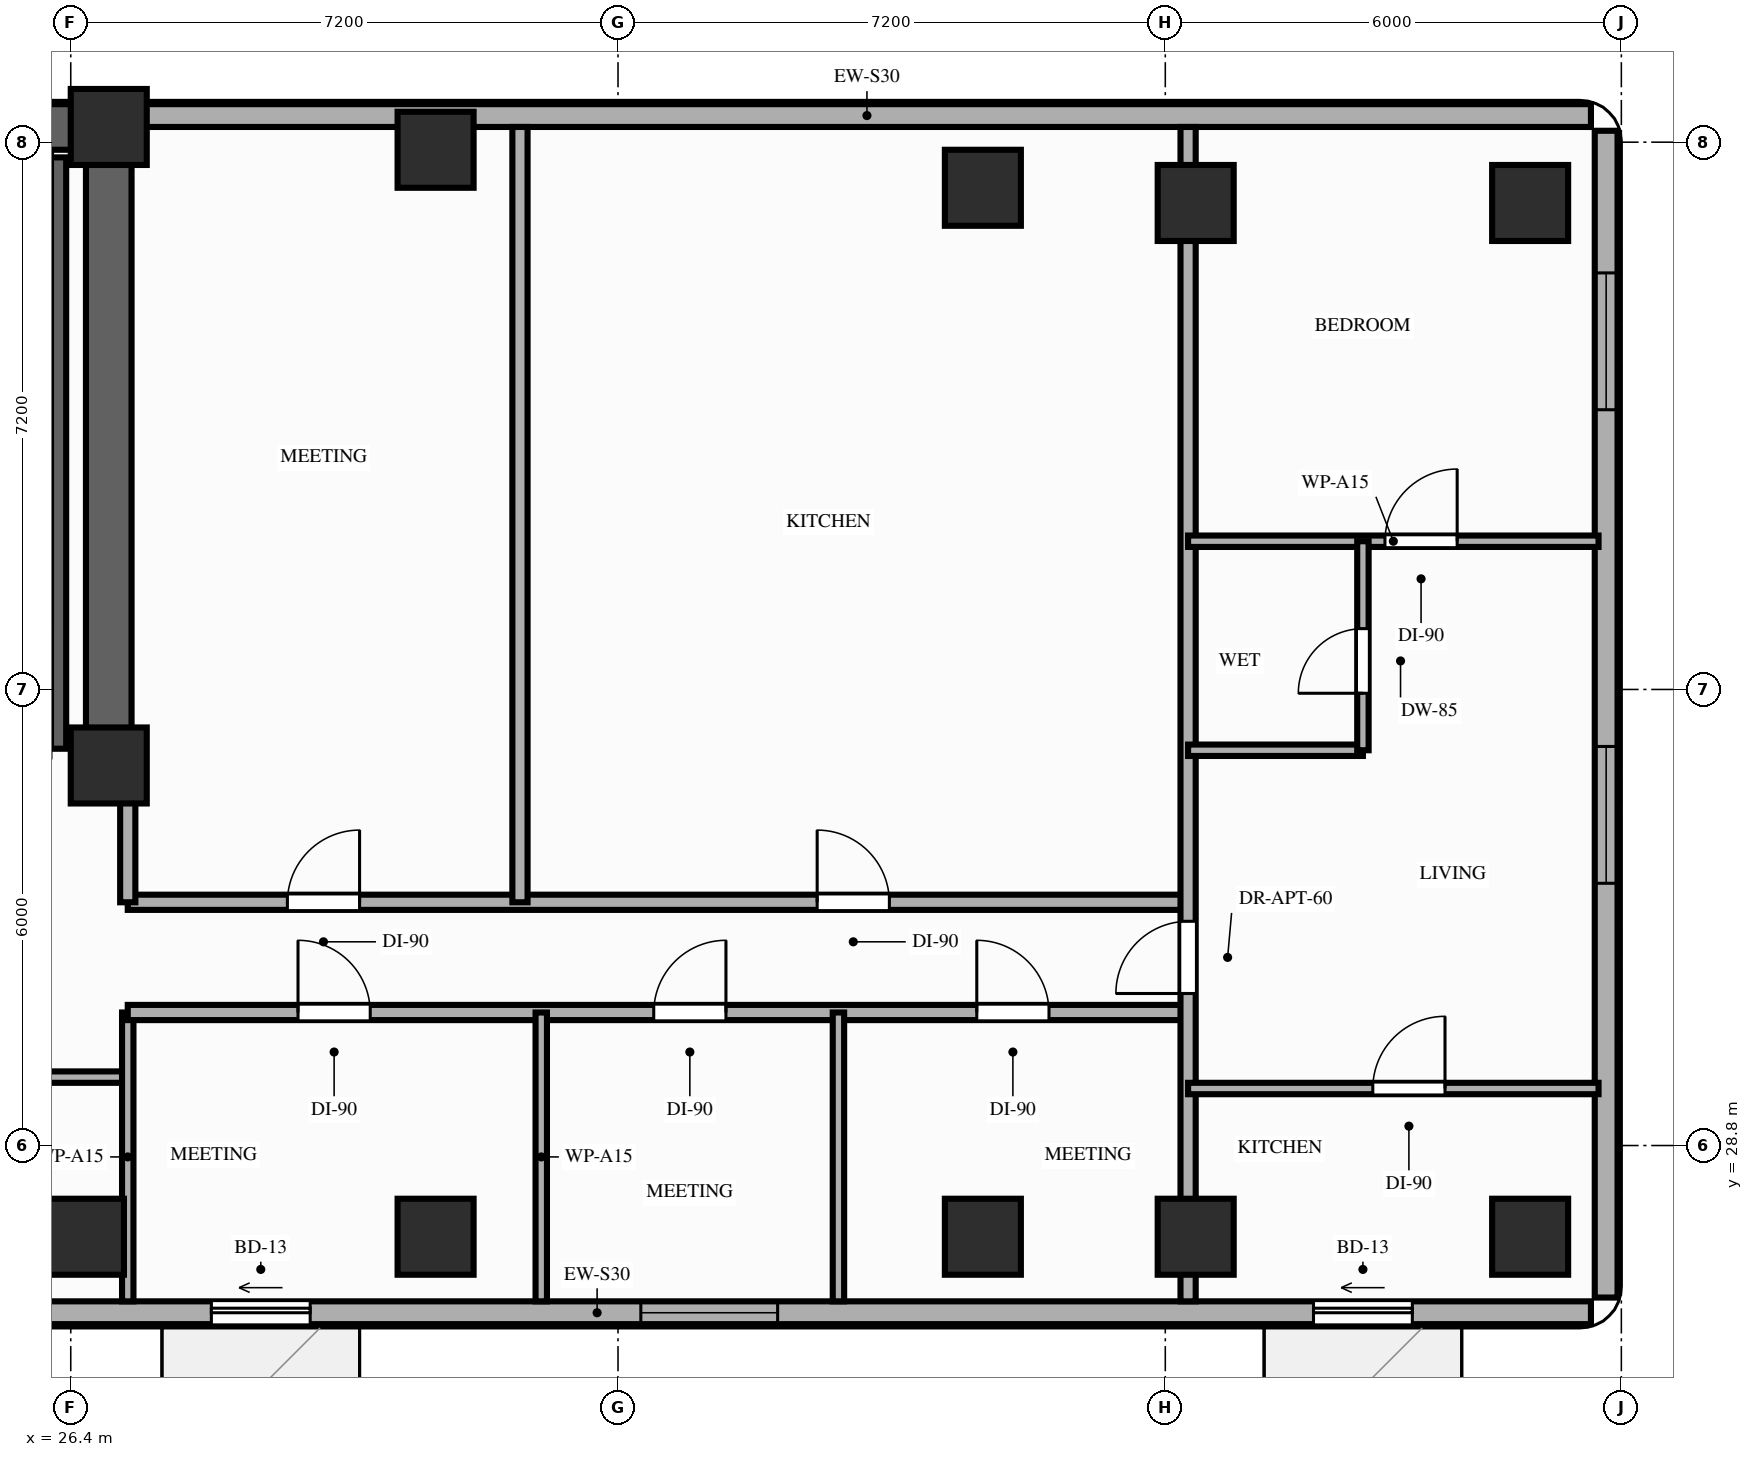
"""IFC4 building model, lengths in metres.
Left out: names, types, materials, properties, quantities, classifications, styles, units other than length and angle.
Written with IfcOpenShell. Run it as: python <this file> out.ifc"""

import sys

from ifc_helpers import new_model, si_unit, direction, frame, frame_2d, origin, origin_2d, place, context, subcontext, project, spatial, rectangle, extrude, element, fill, save


model = new_model("IFC4")
c1 = context("Model", 3, precision=1e-05, world=origin(), true_north=direction((0.0, 1.0)))
c2 = subcontext(c1, "Body", "Model", "MODEL_VIEW")
j1 = project(units=[si_unit("LENGTHUNIT", "METRE"), si_unit("PLANEANGLEUNIT", "RADIAN")], contexts=[c1])
p1 = place(None, origin())
s1 = spatial("IfcSite", under=j1, at=p1, CompositionType="ELEMENT")
p2 = place(p1, origin())
s2 = spatial("IfcBuilding", under=s1, at=p2, CompositionType="ELEMENT")
p3 = place(p2, frame((0.0, 0.0, 110.6)))
s3 = spatial("IfcBuildingStorey", under=s2, at=p3, CompositionType="ELEMENT", Elevation=110.6)
for number, where, z_axis, x_axis in (
    (1, (26.9, 33.8, 0.0), (0.0, 0.0, 1.0), (1.0, 0.0, 0.0)),
    (2, (26.9, 42.2, 0.0), (0.0, 0.0, 1.0), (1.0, 0.0, 0.0)),
    (3, (26.6, 27.6, 0.0), (0.0, 0.0, 1.0), (1.0, 0.0, 0.0)),
    (4, (31.2, 27.6, 0.0), (0.0, 0.0, 1.0), (1.0, 0.0, 0.0)),
    (5, (31.2, 41.9, 0.0), (0.0, 0.0, 1.0), (1.0, 0.0, 0.0)),
    (6, (38.4, 27.6, 0.0), (0.0, 0.0, 1.0), (1.0, 0.0, 0.0)),
    (7, (38.4, 41.4, 0.0), (0.0, 0.0, 1.0), (1.0, 0.0, 0.0)),
    (8, (41.2, 27.6, 0.0), (0.0, 0.0, 1.0), (1.0, 0.0, 0.0)),
    (9, (41.2, 41.2, 0.0), (0.0, 0.0, 1.0), (1.0, 0.0, 0.0)),
    (10, (45.6, 27.6, 0.0), (0.0, 0.0, 1.0), (1.0, 0.0, 0.0)),
    (11, (45.6, 41.2, 0.0), (0.0, 0.0, 1.0), (1.0, 0.0, 0.0)),
):
    element("IfcColumn", number, at=place(p3, frame(where, z_axis=z_axis, x_axis=x_axis)), inside=s3, PredefinedType="COLUMN", context=c2, shape_type="SweptSolid", body=[
        extrude(rectangle(XDim=1.0, YDim=1.0, at=origin_2d()), origin(), (0.0, 0.0, 1.0), 3.2),
    ])
p4 = place(p3, frame((46.4, 42.35, 0.0), z_axis=(0.0, 0.0, 1.0), x_axis=(-1.0, 0.0, 0.0)))
e12 = element("IfcWall", 12, at=p4, inside=s3, PredefinedType="STANDARD", context=c2, shape_type="SweptSolid", body=[
    extrude(rectangle(XDim=19.05, YDim=0.3, at=frame_2d((9.525, 0.0))), origin(), (0.0, 0.0, 1.0), 2.4),
])
p5 = place(p3, frame((20.25, 26.6, 0.0), z_axis=(0.0, 0.0, 1.0), x_axis=(1.0, 0.0, 0.0)))
e13 = element("IfcWall", 13, at=p5, inside=s3, PredefinedType="STANDARD", context=c2, shape_type="SweptSolid", body=[
    extrude(rectangle(XDim=26.15, YDim=0.3, at=frame_2d((13.075, 0.0))), origin(), (0.0, 0.0, 1.0), 2.7),
])
p6 = place(p5, frame((8.0, 0.0, 0.0)))
e14 = element("IfcOpeningElement", 14, at=p6, cuts=e13, PredefinedType="OPENING", context=c2, shape_type="SweptSolid", body=[
    extrude(rectangle(XDim=1.3, YDim=2.08, at=frame_2d((0.65, 1.04))), frame((0.0, 0.16, 0.0), z_axis=(0.0, -1.0, 0.0), x_axis=(1.0, 0.0, 0.0)), (0.0, 0.0, 1.0), 0.32),
])
p7 = place(p5, frame((22.5, 0.0, 0.0)))
e15 = element("IfcOpeningElement", 15, at=p7, cuts=e13, PredefinedType="OPENING", context=c2, shape_type="SweptSolid", body=[
    extrude(rectangle(XDim=1.3, YDim=2.08, at=frame_2d((0.65, 1.04))), frame((0.0, 0.16, 0.0), z_axis=(0.0, -1.0, 0.0), x_axis=(1.0, 0.0, 0.0)), (0.0, 0.0, 1.0), 0.32),
])
p8 = place(p5, frame((2.25, 0.0, 0.85)))
e16 = element("IfcOpeningElement", 16, at=p8, cuts=e13, PredefinedType="OPENING", context=c2, shape_type="SweptSolid", body=[
    extrude(rectangle(XDim=1.8, YDim=1.6, at=frame_2d((0.9, 0.8))), frame((0.0, 0.16, 0.0), z_axis=(0.0, -1.0, 0.0), x_axis=(1.0, 0.0, 0.0)), (0.0, 0.0, 1.0), 0.32),
])
p9 = place(p5, frame((13.65, 0.0, 0.85)))
e17 = element("IfcOpeningElement", 17, at=p9, cuts=e13, PredefinedType="OPENING", context=c2, shape_type="SweptSolid", body=[
    extrude(rectangle(XDim=1.8, YDim=1.6, at=frame_2d((0.9, 0.8))), frame((0.0, 0.16, 0.0), z_axis=(0.0, -1.0, 0.0), x_axis=(1.0, 0.0, 0.0)), (0.0, 0.0, 1.0), 0.32),
])
p10 = place(p3, frame((46.6, 26.8, 0.0), z_axis=(0.0, 0.0, 1.0), x_axis=(0.0, 1.0, 0.0)))
e18 = element("IfcWall", 18, at=p10, inside=s3, PredefinedType="STANDARD", context=c2, shape_type="SweptSolid", body=[
    extrude(rectangle(XDim=15.35, YDim=0.3, at=frame_2d((7.675, 0.0))), origin(), (0.0, 0.0, 1.0), 3.02),
])
p11 = place(p10, frame((5.45, 0.0, 0.85)))
e19 = element("IfcOpeningElement", 19, at=p11, cuts=e18, PredefinedType="OPENING", context=c2, shape_type="SweptSolid", body=[
    extrude(rectangle(XDim=1.8, YDim=1.75, at=frame_2d((0.9, 0.875))), frame((0.0, 0.16, 0.0), z_axis=(0.0, -1.0, 0.0), x_axis=(1.0, 0.0, 0.0)), (0.0, 0.0, 1.0), 0.32),
])
p12 = place(p10, frame((11.68, 0.0, 0.85)))
e20 = element("IfcOpeningElement", 20, at=p12, cuts=e18, PredefinedType="OPENING", context=c2, shape_type="SweptSolid", body=[
    extrude(rectangle(XDim=1.8, YDim=1.75, at=frame_2d((0.9, 0.875))), frame((0.0, 0.16, 0.0), z_axis=(0.0, -1.0, 0.0), x_axis=(1.0, 0.0, 0.0)), (0.0, 0.0, 1.0), 0.32),
])
p13 = place(p3, frame((6.45, 42.2, 0.0), z_axis=(0.0, 0.0, 1.0), x_axis=(1.0, 0.0, 0.0)))
e21 = element("IfcWall", 21, at=p13, inside=s3, PredefinedType="SHEAR", context=c2, shape_type="SweptSolid", body=[
    extrude(rectangle(XDim=20.45, YDim=0.6, at=frame_2d((10.225, 0.0))), origin(), (0.0, 0.0, 1.0), 3.02),
])
p14 = place(p3, frame((26.9, 33.8, 0.0), z_axis=(0.0, 0.0, 1.0), x_axis=(0.0, 1.0, 0.0)))
e22 = element("IfcWall", 22, at=p14, inside=s3, PredefinedType="SHEAR", context=c2, shape_type="SweptSolid", body=[
    extrude(rectangle(XDim=7.95, YDim=0.6, at=frame_2d((3.975, 0.0))), origin(), (0.0, 0.0, 1.0), 3.02),
])
p15 = place(p3, frame((26.24, 34.02, 0.0), z_axis=(0.0, 0.0, 1.0), x_axis=(0.0, 1.0, 0.0)))
e23 = element("IfcWall", 23, at=p15, inside=s3, PredefinedType="SHEAR", context=c2, shape_type="SweptSolid", body=[
    extrude(rectangle(XDim=7.78, YDim=0.2, at=frame_2d((3.89, 0.0))), origin(), (0.0, 0.0, 1.0), 3.02),
])
p16 = place(p3, frame((20.45, 29.7, 0.0), z_axis=(0.0, 0.0, 1.0), x_axis=(1.0, 0.0, 0.0)))
e24 = element("IfcWall", 24, at=p16, inside=s3, PredefinedType="PARTITIONING", context=c2, shape_type="SweptSolid", body=[
    extrude(rectangle(XDim=6.7, YDim=0.15, at=frame_2d((3.35, 0.0))), origin(), (0.0, 0.0, 1.0), 3.02),
])
p17 = place(p16, frame((2.8, 0.0, 0.0)))
e25 = element("IfcOpeningElement", 25, at=p17, cuts=e24, PredefinedType="OPENING", context=c2, shape_type="SweptSolid", body=[
    extrude(rectangle(XDim=0.95, YDim=2.15, at=frame_2d((0.475, 1.075))), frame((0.0, 0.085, 0.0), z_axis=(0.0, -1.0, 0.0), x_axis=(1.0, 0.0, 0.0)), (0.0, 0.0, 1.0), 0.17),
])
p18 = place(p3, frame((27.15, 26.75, 0.0), z_axis=(0.0, 0.0, 1.0), x_axis=(0.0, 1.0, 0.0)))
e26 = element("IfcWall", 26, at=p18, inside=s3, PredefinedType="PARTITIONING", context=c2, shape_type="SweptSolid", body=[
    extrude(rectangle(XDim=3.8, YDim=0.15, at=frame_2d((1.9, 0.0))), origin(), (0.0, 0.0, 1.0), 2.4),
])
p19 = place(p3, frame((27.15, 30.55, 0.0), z_axis=(0.0, 0.0, 1.0), x_axis=(1.0, 0.0, 0.0)))
e27 = element("IfcWall", 27, at=p19, inside=s3, PredefinedType="PARTITIONING", context=c2, shape_type="SweptSolid", body=[
    extrude(rectangle(XDim=13.95, YDim=0.2, at=frame_2d((6.975, 0.0))), origin(), (0.0, 0.0, 1.0), 2.4),
])
p20 = place(p19, frame((2.24, 0.0, 0.0)))
e28 = element("IfcOpeningElement", 28, at=p20, cuts=e27, PredefinedType="OPENING", context=c2, shape_type="SweptSolid", body=[
    extrude(rectangle(XDim=0.95, YDim=2.15, at=frame_2d((0.475, 1.075))), frame((0.0, 0.11, 0.0), z_axis=(0.0, -1.0, 0.0), x_axis=(1.0, 0.0, 0.0)), (0.0, 0.0, 1.0), 0.22),
])
p21 = place(p19, frame((6.92, 0.0, 0.0)))
e29 = element("IfcOpeningElement", 29, at=p21, cuts=e27, PredefinedType="OPENING", context=c2, shape_type="SweptSolid", body=[
    extrude(rectangle(XDim=0.95, YDim=2.15, at=frame_2d((0.475, 1.075))), frame((0.0, 0.11, 0.0), z_axis=(0.0, -1.0, 0.0), x_axis=(1.0, 0.0, 0.0)), (0.0, 0.0, 1.0), 0.22),
])
p22 = place(p19, frame((11.17, 0.0, 0.0)))
e30 = element("IfcOpeningElement", 30, at=p22, cuts=e27, PredefinedType="OPENING", context=c2, shape_type="SweptSolid", body=[
    extrude(rectangle(XDim=0.95, YDim=2.15, at=frame_2d((0.475, 1.075))), frame((0.0, 0.11, 0.0), z_axis=(0.0, -1.0, 0.0), x_axis=(1.0, 0.0, 0.0)), (0.0, 0.0, 1.0), 0.22),
])
p23 = place(p3, frame((27.15, 32.0, 0.0), z_axis=(0.0, 0.0, 1.0), x_axis=(1.0, 0.0, 0.0)))
e31 = element("IfcWall", 31, at=p23, inside=s3, PredefinedType="PARTITIONING", context=c2, shape_type="SweptSolid", body=[
    extrude(rectangle(XDim=13.95, YDim=0.2, at=frame_2d((6.975, 0.0))), origin(), (0.0, 0.0, 1.0), 2.4),
])
p24 = place(p23, frame((2.1, 0.0, 0.0)))
e32 = element("IfcOpeningElement", 32, at=p24, cuts=e31, PredefinedType="OPENING", context=c2, shape_type="SweptSolid", body=[
    extrude(rectangle(XDim=0.95, YDim=2.15, at=frame_2d((0.475, 1.075))), frame((0.0, 0.11, 0.0), z_axis=(0.0, -1.0, 0.0), x_axis=(1.0, 0.0, 0.0)), (0.0, 0.0, 1.0), 0.22),
])
p25 = place(p23, frame((9.07, 0.0, 0.0)))
e33 = element("IfcOpeningElement", 33, at=p25, cuts=e31, PredefinedType="OPENING", context=c2, shape_type="SweptSolid", body=[
    extrude(rectangle(XDim=0.95, YDim=2.15, at=frame_2d((0.475, 1.075))), frame((0.0, 0.11, 0.0), z_axis=(0.0, -1.0, 0.0), x_axis=(1.0, 0.0, 0.0)), (0.0, 0.0, 1.0), 0.22),
])
p26 = place(p3, frame((27.15, 32.0, 0.0), z_axis=(0.0, 0.0, 1.0), x_axis=(0.0, 1.0, 0.0)))
e34 = element("IfcWall", 34, at=p26, inside=s3, PredefinedType="PARTITIONING", context=c2, shape_type="SweptSolid", body=[
    extrude(rectangle(XDim=1.68, YDim=0.2, at=frame_2d((0.84, 0.0))), origin(), (0.0, 0.0, 1.0), 2.4),
])
p27 = place(p3, frame((41.1, 26.75, 0.0), z_axis=(0.0, 0.0, 1.0), x_axis=(0.0, 1.0, 0.0)))
e35 = element("IfcWall", 35, at=p27, inside=s3, PredefinedType="PARTITIONING", context=c2, shape_type="SweptSolid", body=[
    extrude(rectangle(XDim=15.45, YDim=0.2, at=frame_2d((7.725, 0.0))), origin(), (0.0, 0.0, 1.0), 2.4),
])
p28 = place(p27, frame((4.05, 0.0, 0.0)))
e36 = element("IfcOpeningElement", 36, at=p28, cuts=e35, PredefinedType="OPENING", context=c2, shape_type="SweptSolid", body=[
    extrude(rectangle(XDim=0.95, YDim=2.15, at=frame_2d((0.475, 1.075))), frame((0.0, 0.11, 0.0), z_axis=(0.0, -1.0, 0.0), x_axis=(1.0, 0.0, 0.0)), (0.0, 0.0, 1.0), 0.22),
])
p29 = place(p3, frame((41.1, 29.55, 0.0), z_axis=(0.0, 0.0, 1.0), x_axis=(1.0, 0.0, 0.0)))
e37 = element("IfcWall", 37, at=p29, inside=s3, PredefinedType="PARTITIONING", context=c2, shape_type="SweptSolid", body=[
    extrude(rectangle(XDim=5.4, YDim=0.15, at=frame_2d((2.7, 0.0))), origin(), (0.0, 0.0, 1.0), 2.4),
])
p30 = place(p29, frame((2.43, 0.0, 0.0)))
e38 = element("IfcOpeningElement", 38, at=p30, cuts=e37, PredefinedType="OPENING", context=c2, shape_type="SweptSolid", body=[
    extrude(rectangle(XDim=0.95, YDim=2.15, at=frame_2d((0.475, 1.075))), frame((0.0, 0.085, 0.0), z_axis=(0.0, -1.0, 0.0), x_axis=(1.0, 0.0, 0.0)), (0.0, 0.0, 1.0), 0.17),
])
p31 = place(p3, frame((41.1, 36.75, 0.0), z_axis=(0.0, 0.0, 1.0), x_axis=(1.0, 0.0, 0.0)))
e39 = element("IfcWall", 39, at=p31, inside=s3, PredefinedType="PARTITIONING", context=c2, shape_type="SweptSolid", body=[
    extrude(rectangle(XDim=5.4, YDim=0.15, at=frame_2d((2.7, 0.0))), origin(), (0.0, 0.0, 1.0), 2.4),
])
p32 = place(p31, frame((2.59, 0.0, 0.0)))
e40 = element("IfcOpeningElement", 40, at=p32, cuts=e39, PredefinedType="OPENING", context=c2, shape_type="SweptSolid", body=[
    extrude(rectangle(XDim=0.95, YDim=2.15, at=frame_2d((0.475, 1.075))), frame((0.0, 0.085, 0.0), z_axis=(0.0, -1.0, 0.0), x_axis=(1.0, 0.0, 0.0)), (0.0, 0.0, 1.0), 0.17),
])
p33 = place(p3, frame((41.1, 34.0, 0.0), z_axis=(0.0, 0.0, 1.0), x_axis=(1.0, 0.0, 0.0)))
e41 = element("IfcWall", 41, at=p33, inside=s3, PredefinedType="PARTITIONING", context=c2, shape_type="SweptSolid", body=[
    extrude(rectangle(XDim=2.3, YDim=0.15, at=frame_2d((1.15, 0.0))), origin(), (0.0, 0.0, 1.0), 2.4),
])
p34 = place(p3, frame((43.4, 34.0, 0.0), z_axis=(0.0, 0.0, 1.0), x_axis=(0.0, 1.0, 0.0)))
e42 = element("IfcWall", 42, at=p34, inside=s3, PredefinedType="PARTITIONING", context=c2, shape_type="SweptSolid", body=[
    extrude(rectangle(XDim=2.75, YDim=0.15, at=frame_2d((1.375, 0.0))), origin(), (0.0, 0.0, 1.0), 2.6),
])
p35 = place(p34, frame((0.75, 0.0, 0.0)))
e43 = element("IfcOpeningElement", 43, at=p35, cuts=e42, PredefinedType="OPENING", context=c2, shape_type="SweptSolid", body=[
    extrude(rectangle(XDim=0.85, YDim=2.1, at=frame_2d((0.425, 1.05))), frame((0.0, 0.085, 0.0), z_axis=(0.0, -1.0, 0.0), x_axis=(1.0, 0.0, 0.0)), (0.0, 0.0, 1.0), 0.17),
])
for number, where, z_axis, x_axis in (
    (44, (32.59, 26.75, 0.0), (0.0, 0.0, 1.0), (0.0, 1.0, 0.0)),
    (45, (36.5, 26.75, 0.0), (0.0, 0.0, 1.0), (0.0, 1.0, 0.0)),
):
    element("IfcWall", number, at=place(p3, frame(where, z_axis=z_axis, x_axis=x_axis)), inside=s3, PredefinedType="PARTITIONING", context=c2, shape_type="SweptSolid", body=[
        extrude(rectangle(XDim=3.8, YDim=0.15, at=frame_2d((1.9, 0.0))), origin(), (0.0, 0.0, 1.0), 2.4),
    ])
p36 = place(p3, frame((32.31, 32.0, 0.0), z_axis=(0.0, 0.0, 1.0), x_axis=(0.0, 1.0, 0.0)))
e46 = element("IfcWall", 46, at=p36, inside=s3, PredefinedType="PARTITIONING", context=c2, shape_type="SweptSolid", body=[
    extrude(rectangle(XDim=10.2, YDim=0.2, at=frame_2d((5.1, 0.0))), origin(), (0.0, 0.0, 1.0), 2.4),
])
p37 = place(p6, origin())
e47 = element("IfcDoor", 47, at=p37, inside=s3, OperationType="SLIDING_TO_LEFT", PredefinedType="DOOR", context=c2, shape_type="SweptSolid", body=[
    extrude(rectangle(XDim=1.3, YDim=2.08, at=frame_2d((0.65, 1.04))), frame((0.0, 0.025, 0.0), z_axis=(0.0, -1.0, 0.0), x_axis=(1.0, 0.0, 0.0)), (0.0, 0.0, 1.0), 0.05),
])
fill(e14, e47)
p38 = place(p7, origin())
e48 = element("IfcDoor", 48, at=p38, inside=s3, OperationType="SLIDING_TO_LEFT", PredefinedType="DOOR", context=c2, shape_type="SweptSolid", body=[
    extrude(rectangle(XDim=1.3, YDim=2.08, at=frame_2d((0.65, 1.04))), frame((0.0, 0.025, 0.0), z_axis=(0.0, -1.0, 0.0), x_axis=(1.0, 0.0, 0.0)), (0.0, 0.0, 1.0), 0.05),
])
fill(e15, e48)
p39 = place(p11, origin())
e49 = element("IfcWindow", 49, at=p39, inside=s3, PartitioningType="SINGLE_PANEL", PredefinedType="WINDOW", context=c2, shape_type="SweptSolid", body=[
    extrude(rectangle(XDim=1.8, YDim=1.75, at=frame_2d((0.9, 0.875))), frame((0.0, 0.03, 0.0), z_axis=(0.0, -1.0, 0.0), x_axis=(1.0, 0.0, 0.0)), (0.0, 0.0, 1.0), 0.06),
])
fill(e19, e49)
p40 = place(p12, origin())
e50 = element("IfcWindow", 50, at=p40, inside=s3, PartitioningType="SINGLE_PANEL", PredefinedType="WINDOW", context=c2, shape_type="SweptSolid", body=[
    extrude(rectangle(XDim=1.8, YDim=1.75, at=frame_2d((0.9, 0.875))), frame((0.0, 0.03, 0.0), z_axis=(0.0, -1.0, 0.0), x_axis=(1.0, 0.0, 0.0)), (0.0, 0.0, 1.0), 0.06),
])
fill(e20, e50)
p41 = place(p9, origin())
e51 = element("IfcWindow", 51, at=p41, inside=s3, PartitioningType="SINGLE_PANEL", PredefinedType="WINDOW", context=c2, shape_type="SweptSolid", body=[
    extrude(rectangle(XDim=1.8, YDim=1.6, at=frame_2d((0.9, 0.8))), frame((0.0, 0.03, 0.0), z_axis=(0.0, -1.0, 0.0), x_axis=(1.0, 0.0, 0.0)), (0.0, 0.0, 1.0), 0.06),
])
fill(e17, e51)
p42 = place(p28, origin())
e52 = element("IfcDoor", 52, at=p42, inside=s3, OperationType="SINGLE_SWING_LEFT", PredefinedType="DOOR", context=c2, shape_type="SweptSolid", body=[
    extrude(rectangle(XDim=0.95, YDim=2.15, at=frame_2d((0.475, 1.075))), frame((0.0, 0.025, 0.0), z_axis=(0.0, -1.0, 0.0), x_axis=(1.0, 0.0, 0.0)), (0.0, 0.0, 1.0), 0.05),
])
fill(e36, e52)
p43 = place(p32, origin())
e53 = element("IfcDoor", 53, at=p43, inside=s3, OperationType="SINGLE_SWING_RIGHT", PredefinedType="DOOR", context=c2, shape_type="SweptSolid", body=[
    extrude(rectangle(XDim=0.95, YDim=2.15, at=frame_2d((0.475, 1.075))), frame((0.0, 0.025, 0.0), z_axis=(0.0, -1.0, 0.0), x_axis=(1.0, 0.0, 0.0)), (0.0, 0.0, 1.0), 0.05),
])
fill(e40, e53)
p44 = place(p35, origin())
e54 = element("IfcDoor", 54, at=p44, inside=s3, OperationType="SINGLE_SWING_LEFT", PredefinedType="DOOR", context=c2, shape_type="SweptSolid", body=[
    extrude(rectangle(XDim=0.85, YDim=2.1, at=frame_2d((0.425, 1.05))), frame((0.0, 0.025, 0.0), z_axis=(0.0, -1.0, 0.0), x_axis=(1.0, 0.0, 0.0)), (0.0, 0.0, 1.0), 0.05),
])
fill(e43, e54)
p45 = place(p30, origin())
e55 = element("IfcDoor", 55, at=p45, inside=s3, OperationType="SINGLE_SWING_RIGHT", PredefinedType="DOOR", context=c2, shape_type="SweptSolid", body=[
    extrude(rectangle(XDim=0.95, YDim=2.15, at=frame_2d((0.475, 1.075))), frame((0.0, 0.025, 0.0), z_axis=(0.0, -1.0, 0.0), x_axis=(1.0, 0.0, 0.0)), (0.0, 0.0, 1.0), 0.05),
])
fill(e38, e55)
p46 = place(p20, origin())
e56 = element("IfcDoor", 56, at=p46, inside=s3, OperationType="SINGLE_SWING_LEFT", PredefinedType="DOOR", context=c2, shape_type="SweptSolid", body=[
    extrude(rectangle(XDim=0.95, YDim=2.15, at=frame_2d((0.475, 1.075))), frame((0.0, 0.025, 0.0), z_axis=(0.0, -1.0, 0.0), x_axis=(1.0, 0.0, 0.0)), (0.0, 0.0, 1.0), 0.05),
])
fill(e28, e56)
p47 = place(p21, origin())
e57 = element("IfcDoor", 57, at=p47, inside=s3, OperationType="SINGLE_SWING_RIGHT", PredefinedType="DOOR", context=c2, shape_type="SweptSolid", body=[
    extrude(rectangle(XDim=0.95, YDim=2.15, at=frame_2d((0.475, 1.075))), frame((0.0, 0.025, 0.0), z_axis=(0.0, -1.0, 0.0), x_axis=(1.0, 0.0, 0.0)), (0.0, 0.0, 1.0), 0.05),
])
fill(e29, e57)
p48 = place(p22, origin())
e58 = element("IfcDoor", 58, at=p48, inside=s3, OperationType="SINGLE_SWING_LEFT", PredefinedType="DOOR", context=c2, shape_type="SweptSolid", body=[
    extrude(rectangle(XDim=0.95, YDim=2.15, at=frame_2d((0.475, 1.075))), frame((0.0, 0.025, 0.0), z_axis=(0.0, -1.0, 0.0), x_axis=(1.0, 0.0, 0.0)), (0.0, 0.0, 1.0), 0.05),
])
fill(e30, e58)
p49 = place(p24, origin())
e59 = element("IfcDoor", 59, at=p49, inside=s3, OperationType="SINGLE_SWING_RIGHT", PredefinedType="DOOR", context=c2, shape_type="SweptSolid", body=[
    extrude(rectangle(XDim=0.95, YDim=2.15, at=frame_2d((0.475, 1.075))), frame((0.0, 0.025, 0.0), z_axis=(0.0, -1.0, 0.0), x_axis=(1.0, 0.0, 0.0)), (0.0, 0.0, 1.0), 0.05),
])
fill(e32, e59)
p50 = place(p25, origin())
e60 = element("IfcDoor", 60, at=p50, inside=s3, OperationType="SINGLE_SWING_LEFT", PredefinedType="DOOR", context=c2, shape_type="SweptSolid", body=[
    extrude(rectangle(XDim=0.95, YDim=2.15, at=frame_2d((0.475, 1.075))), frame((0.0, 0.025, 0.0), z_axis=(0.0, -1.0, 0.0), x_axis=(1.0, 0.0, 0.0)), (0.0, 0.0, 1.0), 0.05),
])
fill(e33, e60)
save(model, sys.argv[1])
